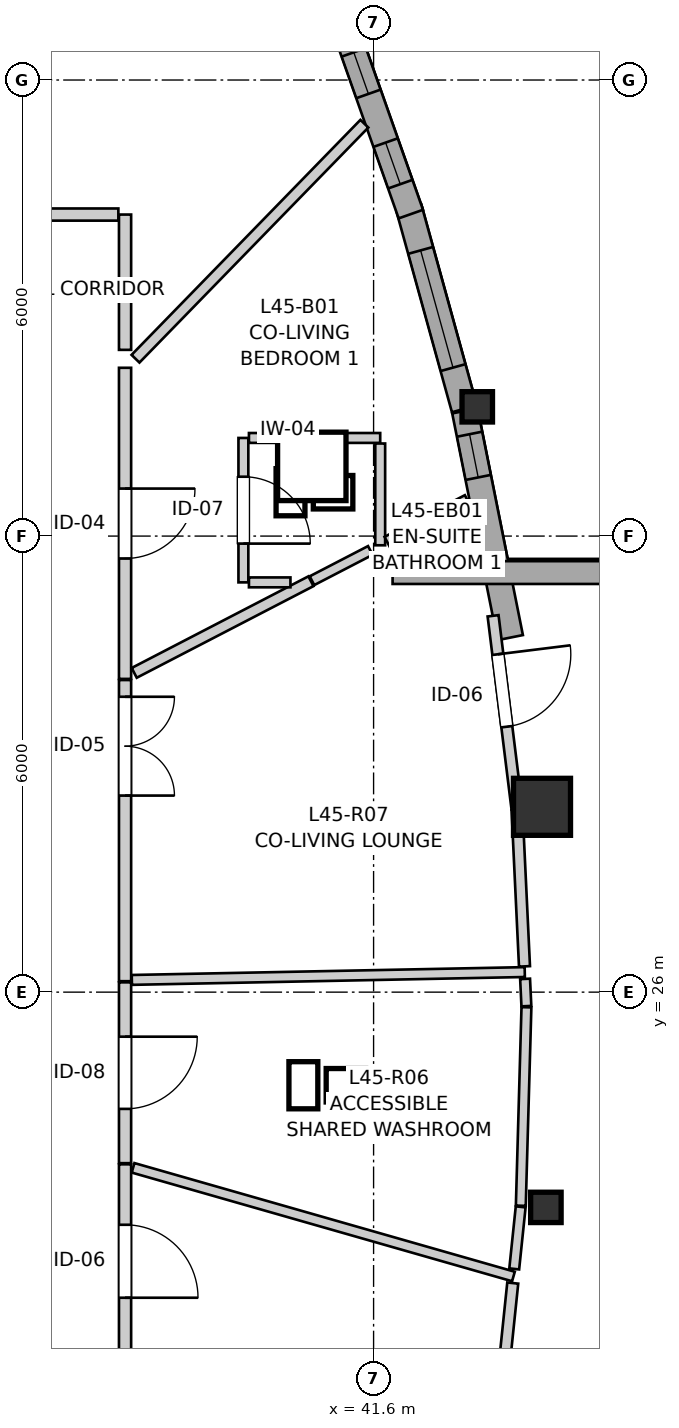
"""IFC4 building model, lengths in metres.
Left out: names, types, materials, properties, quantities, classifications, styles, units other than length and angle.
Written with IfcOpenShell. Run it as: python <this file> out.ifc"""

import sys

from ifc_helpers import new_model, si_unit, direction, frame, frame_2d, origin, origin_2d, place, context, subcontext, project, spatial, rectangle, i_section, extrude, source, transform, mapped, element, fill, save


model = new_model("IFC4")
c1 = context("Model", 3, precision=1e-05, world=origin(), true_north=direction((0.0, 1.0)))
c2 = subcontext(c1, "Body", "Model", "MODEL_VIEW")
j1 = project(units=[si_unit("LENGTHUNIT", "METRE"), si_unit("PLANEANGLEUNIT", "RADIAN")], contexts=[c1])
p1 = place(None, origin())
s1 = spatial("IfcSite", under=j1, at=p1, CompositionType="ELEMENT")
p2 = place(p1, origin())
s2 = spatial("IfcBuilding", under=s1, at=p2, CompositionType="ELEMENT")
p3 = place(p2, frame((0.0, 0.0, 152.2)))
s3 = spatial("IfcBuildingStorey", under=s2, at=p3, CompositionType="ELEMENT", Elevation=152.2)
m1 = source(origin(), c2, "Body", "SweptSolid", [
    extrude(i_section(OverallWidth=0.401, OverallDepth=0.399, WebThickness=0.023, FlangeThickness=0.036, FilletRadius=0.015, at=origin_2d()), origin(), (0.0, 0.0, 1.0), 2.935),
])
p4 = place(p3, frame((43.867, 23.168, 0.0), z_axis=(0.0, 0.0, 1.0), x_axis=(1.0, 0.0, 0.0)))
e1 = element("IfcColumn", 1, at=p4, inside=s3, PredefinedType="PILASTER", context=c2, shape_type="MappedRepresentation", body=[
    mapped(m1, transform((0.0, 0.0, 0.0), x_axis=(1.0, 0.0, 0.0), y_axis=(0.0, 1.0, 0.0), z_axis=(0.0, 0.0, 1.0), scale=1.0)),
])
m2 = source(origin(), c2, "Body", "SweptSolid", [
    extrude(rectangle(XDim=0.75, YDim=0.75, at=origin_2d()), origin(), (0.0, 0.0, 1.0), 2.935),
])
p5 = place(p3, frame((43.816, 28.438, 0.0), z_axis=(0.0, 0.0, 1.0), x_axis=(1.0, 0.0, 0.0)))
e2 = element("IfcColumn", 2, at=p5, inside=s3, PredefinedType="COLUMN", context=c2, shape_type="MappedRepresentation", body=[
    mapped(m2, transform((0.0, 0.0, 0.0), x_axis=(1.0, 0.0, 0.0), y_axis=(0.0, 1.0, 0.0), z_axis=(0.0, 0.0, 1.0), scale=1.0)),
])
p6 = place(p3, frame((42.964, 33.7, 0.0), z_axis=(0.0, 0.0, 1.0), x_axis=(1.0, 0.0, 0.0)))
e3 = element("IfcColumn", 3, at=p6, inside=s3, PredefinedType="PILASTER", context=c2, shape_type="MappedRepresentation", body=[
    mapped(m1, transform((0.0, 0.0, 0.0), x_axis=(1.0, 0.0, 0.0), y_axis=(0.0, 1.0, 0.0), z_axis=(0.0, 0.0, 1.0), scale=1.0)),
])
p7 = place(p3, frame((43.398, 30.664, 0.0), z_axis=(0.0, 0.0, 1.0), x_axis=(-0.196147002944, 0.980574501624, 0.0)))
e4 = element("IfcWall", 4, at=p7, inside=s3, PredefinedType="SOLIDWALL", context=c2, shape_type="SweptSolid", body=[
    extrude(rectangle(XDim=3.042, YDim=0.34, at=frame_2d((1.521, 0.0))), origin(), (0.0, 0.0, 1.0), 2.515),
])
p8 = place(p7, frame((2.149, 0.0, 0.82)))
e5 = element("IfcOpeningElement", 5, at=p8, cuts=e4, PredefinedType="OPENING", context=c2, shape_type="SweptSolid", body=[
    extrude(rectangle(XDim=0.58, YDim=1.35, at=frame_2d((0.29, 0.675))), frame((0.0, 0.18, 0.0), z_axis=(0.0, -1.0, 0.0), x_axis=(1.0, 0.0, 0.0)), (0.0, 0.0, 1.0), 0.36),
])
p9 = place(p3, frame((42.795, 33.674, 0.0), z_axis=(0.0, 0.0, 1.0), x_axis=(-0.266404970566, 0.963861188999, 0.0)))
e6 = element("IfcWall", 6, at=p9, inside=s3, PredefinedType="SOLIDWALL", context=c2, shape_type="SweptSolid", body=[
    extrude(rectangle(XDim=2.745, YDim=0.34, at=frame_2d((1.372, 0.0))), origin(), (0.0, 0.0, 1.0), 2.515),
])
p10 = place(p9, frame((0.562, 0.0, 0.82)))
e7 = element("IfcOpeningElement", 7, at=p10, cuts=e6, PredefinedType="OPENING", context=c2, shape_type="SweptSolid", body=[
    extrude(rectangle(XDim=1.6, YDim=1.35, at=frame_2d((0.8, 0.675))), frame((0.0, 0.18, 0.0), z_axis=(0.0, -1.0, 0.0), x_axis=(1.0, 0.0, 0.0)), (0.0, 0.0, 1.0), 0.36),
])
p11 = place(p3, frame((42.09, 36.236, 0.0), z_axis=(0.0, 0.0, 1.0), x_axis=(-0.332705243691, 0.943030869495, 0.0)))
e8 = element("IfcWall", 8, at=p11, inside=s3, PredefinedType="SOLIDWALL", context=c2, shape_type="SweptSolid", body=[
    extrude(rectangle(XDim=2.668, YDim=0.34, at=frame_2d((1.334, 0.0))), origin(), (0.0, 0.0, 1.0), 2.515),
])
p12 = place(p11, frame((0.417, 0.0, 0.82)))
e9 = element("IfcOpeningElement", 9, at=p12, cuts=e8, PredefinedType="OPENING", context=c2, shape_type="SweptSolid", body=[
    extrude(rectangle(XDim=0.58, YDim=1.35, at=frame_2d((0.29, 0.675))), frame((0.0, 0.18, 0.0), z_axis=(0.0, -1.0, 0.0), x_axis=(1.0, 0.0, 0.0)), (0.0, 0.0, 1.0), 0.36),
])
p13 = place(p11, frame((1.677, 0.0, 0.82)))
e10 = element("IfcOpeningElement", 10, at=p13, cuts=e8, PredefinedType="OPENING", context=c2, shape_type="SweptSolid", body=[
    extrude(rectangle(XDim=0.58, YDim=1.35, at=frame_2d((0.29, 0.675))), frame((0.0, 0.18, 0.0), z_axis=(0.0, -1.0, 0.0), x_axis=(1.0, 0.0, 0.0)), (0.0, 0.0, 1.0), 0.36),
])
p14 = place(p3, frame((41.85, 31.52, 0.0), z_axis=(0.0, 0.0, 1.0), x_axis=(1.0, 0.0, 0.0)))
e11 = element("IfcWall", 11, at=p14, inside=s3, PredefinedType="SOLIDWALL", context=c2, shape_type="SweptSolid", body=[
    extrude(rectangle(XDim=17.423, YDim=0.3, at=frame_2d((8.711, 0.0))), origin(), (0.0, 0.0, 1.0), 2.115),
])
p15 = place(p3, frame((38.33, 34.214, 0.0), z_axis=(0.0, 0.0, 1.0), x_axis=(0.0, -1.0, 0.0)))
e12 = element("IfcWall", 12, at=p15, inside=s3, PredefinedType="PARTITIONING", context=c2, shape_type="SweptSolid", body=[
    extrude(rectangle(XDim=4.093, YDim=0.16, at=frame_2d((2.046, 0.0))), origin(), (0.0, 0.0, 1.0), 2.935),
])
p16 = place(p15, frame((1.589, 0.0, 0.0)))
e13 = element("IfcOpeningElement", 13, at=p16, cuts=e12, PredefinedType="OPENING", context=c2, shape_type="SweptSolid", body=[
    extrude(rectangle(XDim=0.92, YDim=2.1, at=frame_2d((0.46, 1.05))), frame((0.0, 0.09, 0.0), z_axis=(0.0, -1.0, 0.0), x_axis=(1.0, 0.0, 0.0)), (0.0, 0.0, 1.0), 0.18),
])
p17 = place(p3, frame((38.33, 30.106, 0.0), z_axis=(0.0, 0.0, 1.0), x_axis=(0.0, -1.0, 0.0)))
e14 = element("IfcWall", 14, at=p17, inside=s3, PredefinedType="PARTITIONING", context=c2, shape_type="SweptSolid", body=[
    extrude(rectangle(XDim=3.962, YDim=0.16, at=frame_2d((1.981, 0.0))), origin(), (0.0, 0.0, 1.0), 2.935),
])
p18 = place(p17, frame((0.22, 0.0, 0.0)))
e15 = element("IfcOpeningElement", 15, at=p18, cuts=e14, PredefinedType="OPENING", context=c2, shape_type="SweptSolid", body=[
    extrude(rectangle(XDim=1.3, YDim=2.1, at=frame_2d((0.65, 1.05))), frame((0.0, 0.09, 0.0), z_axis=(0.0, -1.0, 0.0), x_axis=(1.0, 0.0, 0.0)), (0.0, 0.0, 1.0), 0.18),
])
p19 = place(p3, frame((43.172, 30.951, 0.0), z_axis=(0.0, 0.0, 1.0), x_axis=(0.122990311665, -0.99240787141, 0.0)))
e16 = element("IfcWall", 16, at=p19, inside=s3, PredefinedType="PARTITIONING", context=c2, shape_type="SweptSolid", body=[
    extrude(rectangle(XDim=2.561, YDim=0.145, at=frame_2d((1.28, 0.0))), origin(), (0.0, 0.0, 1.0), 2.503),
])
p20 = place(p19, frame((0.51, 0.0, 0.0)))
e17 = element("IfcOpeningElement", 17, at=p20, cuts=e16, PredefinedType="OPENING", context=c2, shape_type="SweptSolid", body=[
    extrude(rectangle(XDim=0.96, YDim=2.1, at=frame_2d((0.48, 1.05))), frame((0.0, 0.083, 0.0), z_axis=(0.0, -1.0, 0.0), x_axis=(1.0, 0.0, 0.0)), (0.0, 0.0, 1.0), 0.165),
])
p21 = place(p3, frame((38.33, 23.735, 0.0), z_axis=(0.0, 0.0, 1.0), x_axis=(0.0, -1.0, 0.0)))
e18 = element("IfcWall", 18, at=p21, inside=s3, PredefinedType="PARTITIONING", context=c2, shape_type="SweptSolid", body=[
    extrude(rectangle(XDim=2.535, YDim=0.16, at=frame_2d((1.268, 0.0))), origin(), (0.0, 0.0, 1.0), 2.935),
])
p22 = place(p21, frame((0.795, 0.0, 0.0)))
e19 = element("IfcOpeningElement", 19, at=p22, cuts=e18, PredefinedType="OPENING", context=c2, shape_type="SweptSolid", body=[
    extrude(rectangle(XDim=0.96, YDim=2.1, at=frame_2d((0.48, 1.05))), frame((0.0, 0.09, 0.0), z_axis=(0.0, -1.0, 0.0), x_axis=(1.0, 0.0, 0.0)), (0.0, 0.0, 1.0), 0.18),
])
p23 = place(p3, frame((38.33, 26.129, 0.0), z_axis=(0.0, 0.0, 1.0), x_axis=(0.0, -1.0, 0.0)))
e20 = element("IfcWall", 20, at=p23, inside=s3, PredefinedType="PARTITIONING", context=c2, shape_type="SweptSolid", body=[
    extrude(rectangle(XDim=2.379, YDim=0.16, at=frame_2d((1.189, 0.0))), origin(), (0.0, 0.0, 1.0), 2.935),
])
p24 = place(p23, frame((0.715, 0.0, 0.0)))
e21 = element("IfcOpeningElement", 21, at=p24, cuts=e20, PredefinedType="OPENING", context=c2, shape_type="SweptSolid", body=[
    extrude(rectangle(XDim=0.95, YDim=2.1, at=frame_2d((0.475, 1.05))), frame((0.0, 0.09, 0.0), z_axis=(0.0, -1.0, 0.0), x_axis=(1.0, 0.0, 0.0)), (0.0, 0.0, 1.0), 0.18),
])
p25 = place(p3, frame((39.887, 33.291, 0.0), z_axis=(0.0, 0.0, 1.0), x_axis=(0.0, -1.0, 0.0)))
e22 = element("IfcWall", 22, at=p25, inside=s3, PredefinedType="PARTITIONING", context=c2, shape_type="SweptSolid", body=[
    extrude(rectangle(XDim=1.9, YDim=0.13, at=frame_2d((0.95, 0.0))), origin(), (0.0, 0.0, 1.0), 2.935),
])
p26 = place(p25, frame((0.51, 0.0, 0.0)))
e23 = element("IfcOpeningElement", 23, at=p26, cuts=e22, PredefinedType="OPENING", context=c2, shape_type="SweptSolid", body=[
    extrude(rectangle(XDim=0.88, YDim=2.05, at=frame_2d((0.44, 1.025))), frame((0.0, 0.075, 0.0), z_axis=(0.0, -1.0, 0.0), x_axis=(1.0, 0.0, 0.0)), (0.0, 0.0, 1.0), 0.15),
])
p27 = place(p3, frame((38.436, 23.689, 0.0), z_axis=(0.0, 0.0, 1.0), x_axis=(0.961531027854, -0.274696345942, 0.0)))
e24 = element("IfcWall", 24, at=p27, inside=s3, PredefinedType="PARTITIONING", context=c2, shape_type="SweptSolid", body=[
    extrude(rectangle(XDim=5.205, YDim=0.13, at=frame_2d((2.602, 0.0))), origin(), (0.0, 0.0, 1.0), 2.935),
])
p28 = place(p3, frame((38.419, 26.161, 0.0), z_axis=(0.0, 0.0, 1.0), x_axis=(0.999801492135, 0.019924264719, 0.0)))
e25 = element("IfcWall", 25, at=p28, inside=s3, PredefinedType="PARTITIONING", context=c2, shape_type="SweptSolid", body=[
    extrude(rectangle(XDim=5.171, YDim=0.13, at=frame_2d((2.585, 0.0))), origin(), (0.0, 0.0, 1.0), 2.935),
])
p29 = place(p3, frame((38.468, 34.333, 0.0), z_axis=(0.0, 0.0, 1.0), x_axis=(0.697683159601, 0.71640645503, 0.0)))
e26 = element("IfcWall", 26, at=p29, inside=s3, PredefinedType="PARTITIONING", context=c2, shape_type="SweptSolid", body=[
    extrude(rectangle(XDim=4.316, YDim=0.145, at=frame_2d((2.158, 0.0))), origin(), (0.0, 0.0, 1.0), 2.935),
])
p30 = place(p3, frame((38.45, 30.2, 0.0), z_axis=(0.0, 0.0, 1.0), x_axis=(0.887788385545, 0.460251868537, 0.0)))
e27 = element("IfcWall", 27, at=p30, inside=s3, PredefinedType="PARTITIONING", context=c2, shape_type="SweptSolid", body=[
    extrude(rectangle(XDim=2.619, YDim=0.145, at=frame_2d((1.31, 0.0))), origin(), (0.0, 0.0, 1.0), 2.935),
])
p31 = place(p3, frame((43.537, 23.19, 0.0), z_axis=(0.0, 0.0, 1.0), x_axis=(0.028319632762, 0.999598918767, 0.0)))
e28 = element("IfcWall", 28, at=p31, inside=s3, PredefinedType="PARTITIONING", context=c2, shape_type="SweptSolid", body=[
    extrude(rectangle(XDim=2.612, YDim=0.13, at=frame_2d((1.306, 0.0))), origin(), (0.0, 0.0, 1.0), 2.503),
])
p32 = place(p3, frame((43.488, 28.395, 0.0), z_axis=(0.0, 0.0, 1.0), x_axis=(0.047441179451, -0.998874033346, 0.0)))
e29 = element("IfcWall", 29, at=p32, inside=s3, PredefinedType="PARTITIONING", context=c2, shape_type="SweptSolid", body=[
    extrude(rectangle(XDim=2.058, YDim=0.145, at=frame_2d((1.029, 0.0))), origin(), (0.0, 0.0, 1.0), 2.503),
])
p33 = place(p3, frame((39.96, 33.291, 0.0), z_axis=(0.0, 0.0, 1.0), x_axis=(1.0, 0.0, 0.0)))
e30 = element("IfcWall", 30, at=p33, inside=s3, PredefinedType="PARTITIONING", context=c2, shape_type="SweptSolid", body=[
    extrude(rectangle(XDim=1.727, YDim=0.13, at=frame_2d((0.864, 0.0))), origin(), (0.0, 0.0, 1.0), 2.935),
])
p34 = place(p3, frame((38.33, 34.45, 0.0), z_axis=(0.0, 0.0, 1.0), x_axis=(0.0, 1.0, 0.0)))
e31 = element("IfcWall", 31, at=p34, inside=s3, PredefinedType="PARTITIONING", context=c2, shape_type="SweptSolid", body=[
    extrude(rectangle(XDim=1.78, YDim=0.16, at=frame_2d((0.89, 0.0))), origin(), (0.0, 0.0, 1.0), 2.935),
])
p35 = place(p3, frame((36.565, 36.23, 0.0), z_axis=(0.0, 0.0, 1.0), x_axis=(1.0, 0.0, 0.0)))
e32 = element("IfcWall", 32, at=p35, inside=s3, PredefinedType="PARTITIONING", context=c2, shape_type="SweptSolid", body=[
    extrude(rectangle(XDim=1.677, YDim=0.16, at=frame_2d((0.838, 0.0))), origin(), (0.0, 0.0, 1.0), 2.935),
])
p36 = place(p3, frame((43.273, 20.646, 0.0), z_axis=(0.0, 0.0, 1.0), x_axis=(0.103045636414, 0.99467662927, 0.0)))
e33 = element("IfcWall", 33, at=p36, inside=s3, PredefinedType="PARTITIONING", context=c2, shape_type="SweptSolid", body=[
    extrude(rectangle(XDim=1.535, YDim=0.145, at=frame_2d((0.768, 0.0))), origin(), (0.0, 0.0, 1.0), 2.503),
])
p37 = place(p3, frame((41.687, 31.879, 0.0), z_axis=(0.0, 0.0, 1.0), x_axis=(0.0, 1.0, 0.0)))
e34 = element("IfcWall", 34, at=p37, inside=s3, PredefinedType="PARTITIONING", context=c2, shape_type="SweptSolid", body=[
    extrude(rectangle(XDim=1.339, YDim=0.13, at=frame_2d((0.669, 0.0))), origin(), (0.0, 0.0, 1.0), 2.935),
])
p38 = place(p3, frame((41.778, 31.926, 0.0), z_axis=(0.0, 0.0, 1.0), x_axis=(0.887683122967, 0.460454854681, 0.0)))
e35 = element("IfcWall", 35, at=p38, inside=s3, PredefinedType="PARTITIONING", context=c2, shape_type="SweptSolid", body=[
    extrude(rectangle(XDim=1.19, YDim=0.145, at=frame_2d((0.595, 0.0))), origin(), (0.0, 0.0, 1.0), 2.935),
])
p39 = place(p3, frame((40.789, 31.413, 0.0), z_axis=(0.0, 0.0, 1.0), x_axis=(0.887895541879, 0.460045113779, 0.0)))
e36 = element("IfcWall", 36, at=p39, inside=s3, PredefinedType="PARTITIONING", context=c2, shape_type="SweptSolid", body=[
    extrude(rectangle(XDim=0.865, YDim=0.13, at=frame_2d((0.432, 0.0))), origin(), (0.0, 0.0, 1.0), 2.935),
])
p40 = place(p3, frame((43.45, 22.359, 0.0), z_axis=(0.0, 0.0, 1.0), x_axis=(0.103538633142, 0.994625432737, 0.0)))
e37 = element("IfcWall", 37, at=p40, inside=s3, PredefinedType="PARTITIONING", context=c2, shape_type="SweptSolid", body=[
    extrude(rectangle(XDim=0.821, YDim=0.13, at=frame_2d((0.41, 0.0))), origin(), (0.0, 0.0, 1.0), 2.503),
])
p41 = place(p3, frame((39.96, 31.391, 0.0), z_axis=(0.0, 0.0, 1.0), x_axis=(1.0, 0.0, 0.0)))
e38 = element("IfcWall", 38, at=p41, inside=s3, PredefinedType="PARTITIONING", context=c2, shape_type="SweptSolid", body=[
    extrude(rectangle(XDim=0.546, YDim=0.13, at=frame_2d((0.273, 0.0))), origin(), (0.0, 0.0, 1.0), 2.103),
])
p42 = place(p3, frame((43.593, 26.174, 0.0), z_axis=(0.0, 0.0, 1.0), x_axis=(0.04762980516, -0.998865056782, 0.0)))
e39 = element("IfcWall", 39, at=p42, inside=s3, PredefinedType="PARTITIONING", context=c2, shape_type="SweptSolid", body=[
    extrude(rectangle(XDim=0.359, YDim=0.13, at=frame_2d((0.179, 0.0))), origin(), (0.0, 0.0, 1.0), 2.503),
])
m3 = source(origin(), c2, "Body", "SweptSolid", [
    extrude(rectangle(XDim=0.58, YDim=1.35, at=frame_2d((0.29, 0.675))), frame((0.0, 0.03, 0.0), z_axis=(0.0, -1.0, 0.0), x_axis=(1.0, 0.0, 0.0)), (0.0, 0.0, 1.0), 0.06),
])
p43 = place(p8, origin())
e40 = element("IfcWindow", 40, at=p43, inside=s3, PartitioningType="SINGLE_PANEL", PredefinedType="WINDOW", context=c2, shape_type="MappedRepresentation", body=[
    mapped(m3, transform((0.0, 0.0, 0.0), x_axis=(1.0, 0.0, 0.0), y_axis=(0.0, 1.0, 0.0), z_axis=(0.0, 0.0, 1.0), scale=1.0)),
])
fill(e5, e40)
m4 = source(origin(), c2, "Body", "SweptSolid", [
    extrude(rectangle(XDim=1.6, YDim=1.35, at=frame_2d((0.8, 0.675))), frame((0.0, 0.03, 0.0), z_axis=(0.0, -1.0, 0.0), x_axis=(1.0, 0.0, 0.0)), (0.0, 0.0, 1.0), 0.06),
])
p44 = place(p10, origin())
e41 = element("IfcWindow", 41, at=p44, inside=s3, PartitioningType="SINGLE_PANEL", PredefinedType="WINDOW", context=c2, shape_type="MappedRepresentation", body=[
    mapped(m4, transform((0.0, 0.0, 0.0), x_axis=(1.0, 0.0, 0.0), y_axis=(0.0, 1.0, 0.0), z_axis=(0.0, 0.0, 1.0), scale=1.0)),
])
fill(e7, e41)
p45 = place(p12, origin())
e42 = element("IfcWindow", 42, at=p45, inside=s3, PartitioningType="SINGLE_PANEL", PredefinedType="WINDOW", context=c2, shape_type="MappedRepresentation", body=[
    mapped(m3, transform((0.0, 0.0, 0.0), x_axis=(1.0, 0.0, 0.0), y_axis=(0.0, 1.0, 0.0), z_axis=(0.0, 0.0, 1.0), scale=1.0)),
])
fill(e9, e42)
p46 = place(p13, origin())
e43 = element("IfcWindow", 43, at=p46, inside=s3, PartitioningType="SINGLE_PANEL", PredefinedType="WINDOW", context=c2, shape_type="MappedRepresentation", body=[
    mapped(m3, transform((0.0, 0.0, 0.0), x_axis=(1.0, 0.0, 0.0), y_axis=(0.0, 1.0, 0.0), z_axis=(0.0, 0.0, 1.0), scale=1.0)),
])
fill(e10, e43)
m5 = source(origin(), c2, "Body", "SweptSolid", [
    extrude(rectangle(XDim=0.92, YDim=2.1, at=frame_2d((0.46, 1.05))), frame((0.0, 0.025, 0.0), z_axis=(0.0, -1.0, 0.0), x_axis=(1.0, 0.0, 0.0)), (0.0, 0.0, 1.0), 0.05),
])
p47 = place(p16, origin())
e44 = element("IfcDoor", 44, at=p47, inside=s3, OperationType="SINGLE_SWING_LEFT", PredefinedType="DOOR", context=c2, shape_type="MappedRepresentation", body=[
    mapped(m5, transform((0.0, 0.0, 0.0), x_axis=(1.0, 0.0, 0.0), y_axis=(0.0, 1.0, 0.0), z_axis=(0.0, 0.0, 1.0), scale=1.0)),
])
fill(e13, e44)
m6 = source(origin(), c2, "Body", "SweptSolid", [
    extrude(rectangle(XDim=1.3, YDim=2.1, at=frame_2d((0.65, 1.05))), frame((0.0, 0.025, 0.0), z_axis=(0.0, -1.0, 0.0), x_axis=(1.0, 0.0, 0.0)), (0.0, 0.0, 1.0), 0.05),
])
p48 = place(p18, origin())
e45 = element("IfcDoor", 45, at=p48, inside=s3, OperationType="DOUBLE_DOOR_SINGLE_SWING", PredefinedType="DOOR", context=c2, shape_type="MappedRepresentation", body=[
    mapped(m6, transform((0.0, 0.0, 0.0), x_axis=(1.0, 0.0, 0.0), y_axis=(0.0, 1.0, 0.0), z_axis=(0.0, 0.0, 1.0), scale=1.0)),
])
fill(e15, e45)
m7 = source(origin(), c2, "Body", "SweptSolid", [
    extrude(rectangle(XDim=0.96, YDim=2.1, at=frame_2d((0.48, 1.05))), frame((0.0, 0.025, 0.0), z_axis=(0.0, -1.0, 0.0), x_axis=(1.0, 0.0, 0.0)), (0.0, 0.0, 1.0), 0.05),
])
p49 = place(p20, origin())
e46 = element("IfcDoor", 46, at=p49, inside=s3, OperationType="SINGLE_SWING_LEFT", PredefinedType="DOOR", context=c2, shape_type="MappedRepresentation", body=[
    mapped(m7, transform((0.0, 0.0, 0.0), x_axis=(1.0, 0.0, 0.0), y_axis=(0.0, 1.0, 0.0), z_axis=(0.0, 0.0, 1.0), scale=1.0)),
])
fill(e17, e46)
p50 = place(p22, origin())
e47 = element("IfcDoor", 47, at=p50, inside=s3, OperationType="SINGLE_SWING_RIGHT", PredefinedType="DOOR", context=c2, shape_type="MappedRepresentation", body=[
    mapped(m7, transform((0.0, 0.0, 0.0), x_axis=(1.0, 0.0, 0.0), y_axis=(0.0, 1.0, 0.0), z_axis=(0.0, 0.0, 1.0), scale=1.0)),
])
fill(e19, e47)
m8 = source(origin(), c2, "Body", "SweptSolid", [
    extrude(rectangle(XDim=0.95, YDim=2.1, at=frame_2d((0.475, 1.05))), frame((0.0, 0.025, 0.0), z_axis=(0.0, -1.0, 0.0), x_axis=(1.0, 0.0, 0.0)), (0.0, 0.0, 1.0), 0.05),
])
p51 = place(p24, origin())
e48 = element("IfcDoor", 48, at=p51, inside=s3, OperationType="SINGLE_SWING_LEFT", PredefinedType="DOOR", context=c2, shape_type="MappedRepresentation", body=[
    mapped(m8, transform((0.0, 0.0, 0.0), x_axis=(1.0, 0.0, 0.0), y_axis=(0.0, 1.0, 0.0), z_axis=(0.0, 0.0, 1.0), scale=1.0)),
])
fill(e21, e48)
m9 = source(origin(), c2, "Body", "SweptSolid", [
    extrude(rectangle(XDim=0.88, YDim=2.05, at=frame_2d((0.44, 1.025))), frame((0.0, 0.025, 0.0), z_axis=(0.0, -1.0, 0.0), x_axis=(1.0, 0.0, 0.0)), (0.0, 0.0, 1.0), 0.05),
])
p52 = place(p26, origin())
e49 = element("IfcDoor", 49, at=p52, inside=s3, OperationType="SINGLE_SWING_RIGHT", PredefinedType="DOOR", context=c2, shape_type="MappedRepresentation", body=[
    mapped(m9, transform((0.0, 0.0, 0.0), x_axis=(1.0, 0.0, 0.0), y_axis=(0.0, 1.0, 0.0), z_axis=(0.0, 0.0, 1.0), scale=1.0)),
])
fill(e23, e49)
save(model, sys.argv[1])
